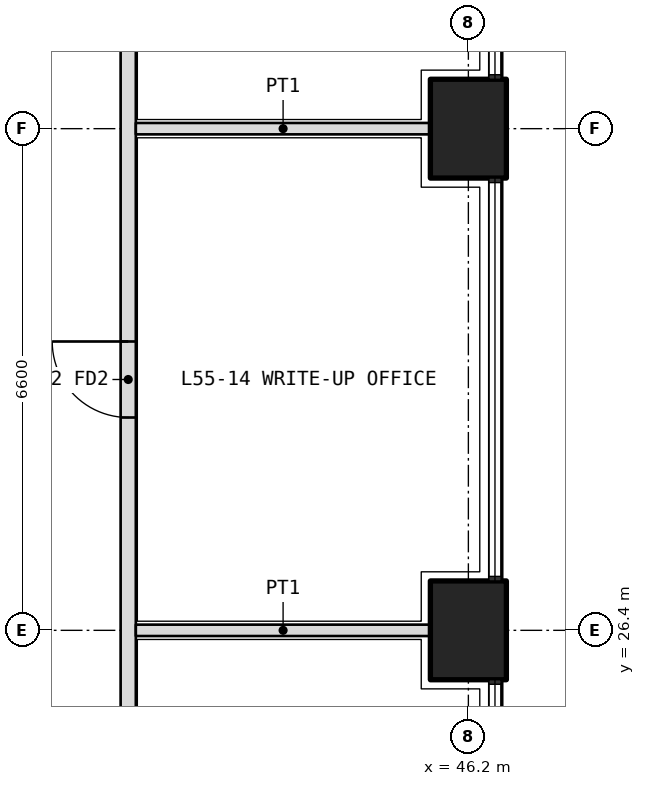
"""IFC4 building model, lengths in metres.
Left out: names, types, materials, properties, quantities, classifications, styles, units other than length and angle.
Written with IfcOpenShell. Run it as: python <this file> out.ifc"""

import sys

from ifc_helpers import new_model, si_unit, direction, frame, frame_2d, origin, origin_2d, place, context, subcontext, project, spatial, rectangle, extrude, element, fill, save


model = new_model("IFC4")
c1 = context("Model", 3, precision=1e-05, world=origin(), true_north=direction((0.0, 1.0)))
c2 = subcontext(c1, "Body", "Model", "MODEL_VIEW")
j1 = project(units=[si_unit("LENGTHUNIT", "METRE"), si_unit("PLANEANGLEUNIT", "RADIAN")], contexts=[c1])
p1 = place(None, origin())
s1 = spatial("IfcSite", under=j1, at=p1, CompositionType="ELEMENT")
p2 = place(p1, origin())
s2 = spatial("IfcBuilding", under=s1, at=p2, CompositionType="ELEMENT")
p3 = place(p2, frame((0.0, 0.0, 241.8)))
s3 = spatial("IfcBuildingStorey", under=s2, at=p3, CompositionType="ELEMENT", Elevation=241.8)
for number, where, z_axis, x_axis in (
    (1, (46.2, 26.4, 0.0), (0.0, 0.0, 1.0), (0.0, 1.0, 0.0)),
    (2, (46.2, 33.0, 0.0), (0.0, 0.0, 1.0), (0.0, 1.0, 0.0)),
):
    element("IfcColumn", number, at=place(p3, frame(where, z_axis=z_axis, x_axis=x_axis)), inside=s3, PredefinedType="COLUMN", context=c2, shape_type="SweptSolid", body=[
        extrude(rectangle(XDim=1.3, YDim=1.0, at=origin_2d()), origin(), (0.0, 0.0, 1.0), 4.2),
    ])
p4 = place(p3, frame((41.725, 7.4, 0.0), z_axis=(0.0, 0.0, 1.0), x_axis=(0.0, 1.0, 0.0)))
e3 = element("IfcWall", 3, at=p4, inside=s3, PredefinedType="PARTITIONING", context=c2, shape_type="SweptSolid", body=[
    extrude(rectangle(XDim=31.4, YDim=0.2, at=frame_2d((15.7, 0.0))), origin(), (0.0, 0.0, 1.0), 3.0),
])
p5 = place(p4, frame((5.65, 0.0, 0.0)))
e4 = element("IfcOpeningElement", 4, at=p5, cuts=e3, PredefinedType="OPENING", context=c2, shape_type="SweptSolid", body=[
    extrude(rectangle(XDim=1.0, YDim=2.1, at=frame_2d((0.5, 1.05))), frame((0.0, 0.11, 0.0), z_axis=(0.0, -1.0, 0.0), x_axis=(1.0, 0.0, 0.0)), (0.0, 0.0, 1.0), 0.22),
])
p6 = place(p4, frame((13.4, 0.0, 0.0)))
e5 = element("IfcOpeningElement", 5, at=p6, cuts=e3, PredefinedType="OPENING", context=c2, shape_type="SweptSolid", body=[
    extrude(rectangle(XDim=1.0, YDim=2.1, at=frame_2d((0.5, 1.05))), frame((0.0, 0.11, 0.0), z_axis=(0.0, -1.0, 0.0), x_axis=(1.0, 0.0, 0.0)), (0.0, 0.0, 1.0), 0.22),
])
p7 = place(p4, frame((16.75, 0.0, 0.0)))
e6 = element("IfcOpeningElement", 6, at=p7, cuts=e3, PredefinedType="OPENING", context=c2, shape_type="SweptSolid", body=[
    extrude(rectangle(XDim=0.9, YDim=2.1, at=frame_2d((0.45, 1.05))), frame((0.0, 0.11, 0.0), z_axis=(0.0, -1.0, 0.0), x_axis=(1.0, 0.0, 0.0)), (0.0, 0.0, 1.0), 0.22),
])
p8 = place(p4, frame((21.8, 0.0, 0.0)))
e7 = element("IfcOpeningElement", 7, at=p8, cuts=e3, PredefinedType="OPENING", context=c2, shape_type="SweptSolid", body=[
    extrude(rectangle(XDim=1.0, YDim=2.1, at=frame_2d((0.5, 1.05))), frame((0.0, 0.11, 0.0), z_axis=(0.0, -1.0, 0.0), x_axis=(1.0, 0.0, 0.0)), (0.0, 0.0, 1.0), 0.22),
])
p9 = place(p4, frame((28.05, 0.0, 0.0)))
e8 = element("IfcOpeningElement", 8, at=p9, cuts=e3, PredefinedType="OPENING", context=c2, shape_type="SweptSolid", body=[
    extrude(rectangle(XDim=1.0, YDim=2.1, at=frame_2d((0.5, 1.05))), frame((0.0, 0.11, 0.0), z_axis=(0.0, -1.0, 0.0), x_axis=(1.0, 0.0, 0.0)), (0.0, 0.0, 1.0), 0.22),
])
for number, where, z_axis, x_axis in (
    (9, (45.7, 26.4, 0.0), (0.0, 0.0, 1.0), (-1.0, 0.0, 0.0)),
    (10, (45.7, 33.0, 0.0), (0.0, 0.0, 1.0), (-1.0, 0.0, 0.0)),
):
    element("IfcWall", number, at=place(p3, frame(where, z_axis=z_axis, x_axis=x_axis)), inside=s3, PredefinedType="PARTITIONING", context=c2, shape_type="SweptSolid", body=[
        extrude(rectangle(XDim=3.875, YDim=0.15, at=frame_2d((1.938, 0.0))), origin(), (0.0, 0.0, 1.0), 3.0),
    ])
p10 = place(p8, origin())
e11 = element("IfcDoor", 11, at=p10, inside=s3, OperationType="SINGLE_SWING_RIGHT", PredefinedType="DOOR", context=c2, shape_type="SweptSolid", body=[
    extrude(rectangle(XDim=1.0, YDim=2.1, at=frame_2d((0.5, 1.05))), frame((0.0, 0.025, 0.0), z_axis=(0.0, -1.0, 0.0), x_axis=(1.0, 0.0, 0.0)), (0.0, 0.0, 1.0), 0.05),
])
fill(e7, e11)
save(model, sys.argv[1])
